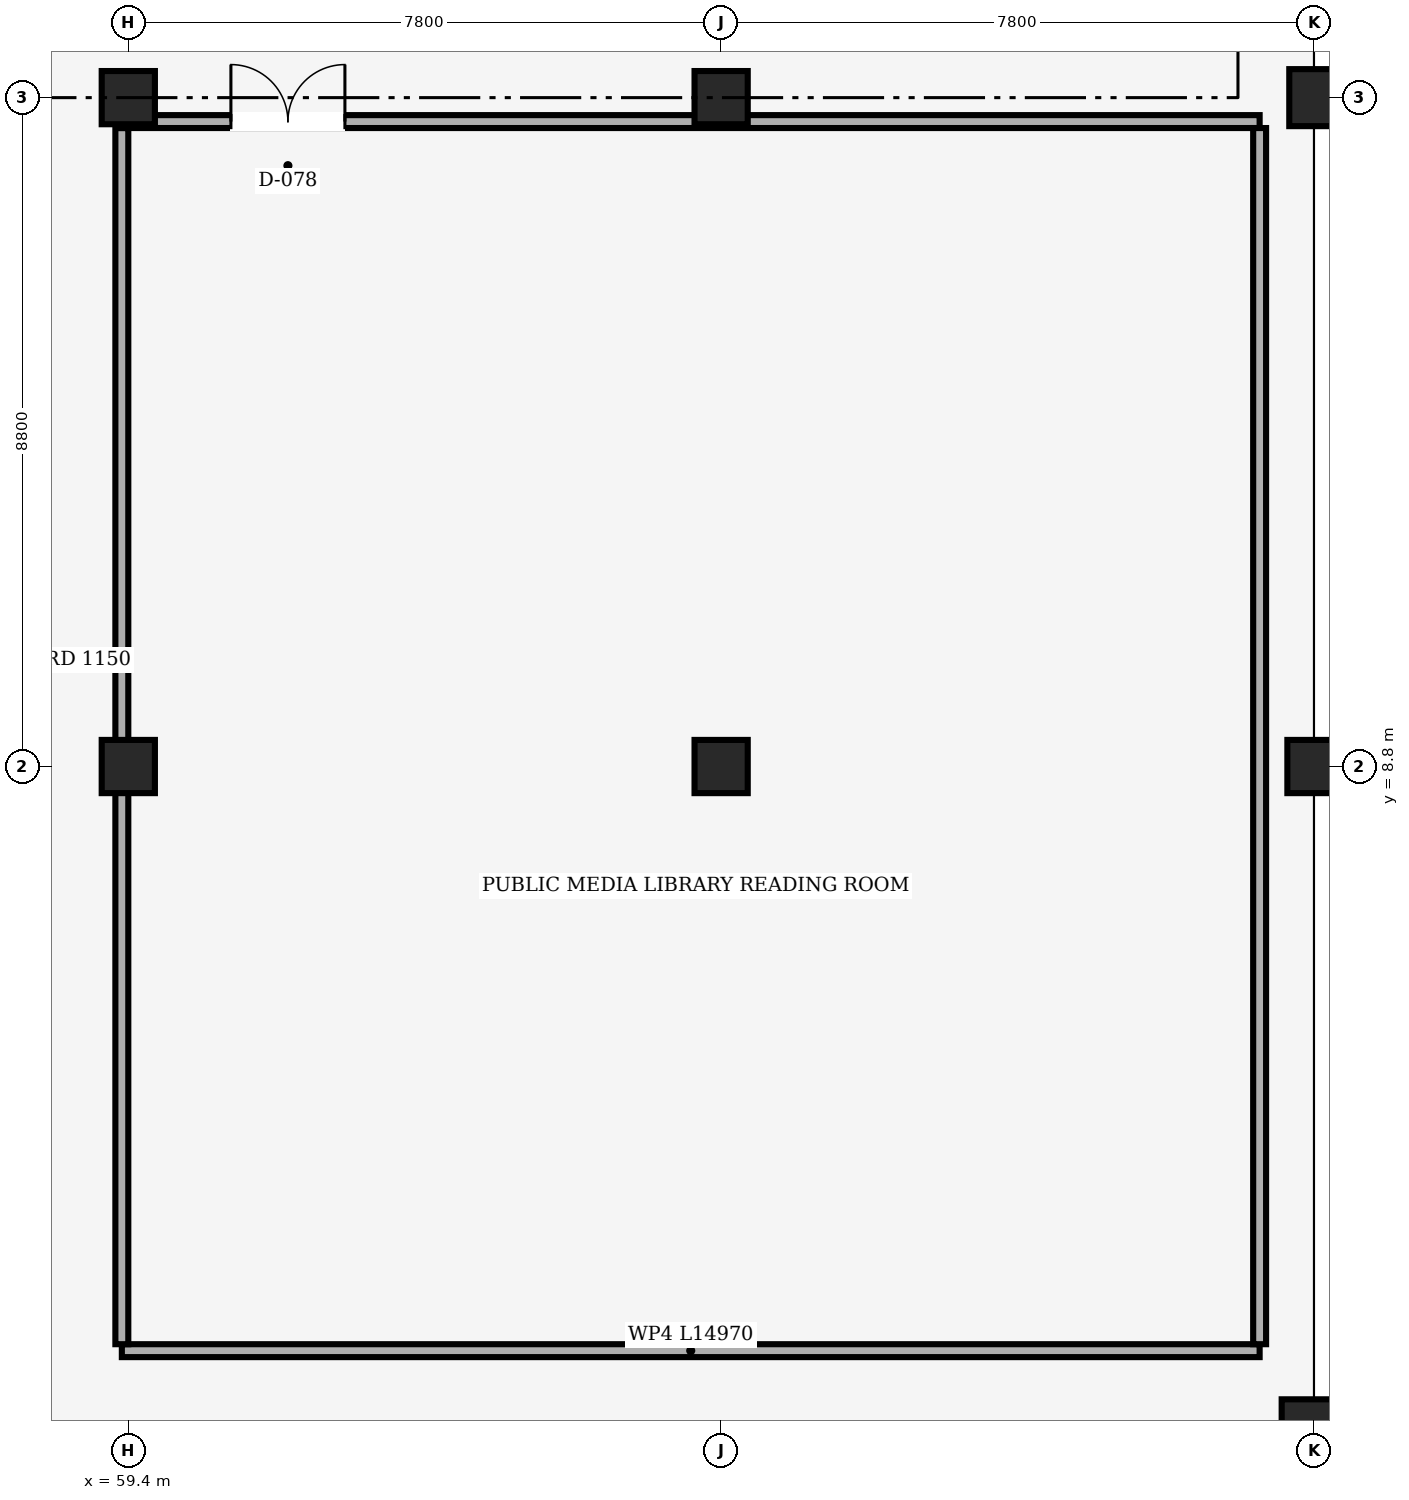
"""IFC4 building model, lengths in metres.
Left out: names, types, materials, properties, quantities, classifications, styles, units other than length and angle.
Written with IfcOpenShell. Run it as: python <this file> out.ifc"""

import sys

from ifc_helpers import new_model, si_unit, direction, frame, frame_2d, origin, origin_2d, place, context, subcontext, project, spatial, rectangle, circle, extrude, element, fill, save


model = new_model("IFC4")
c1 = context("Model", 3, precision=1e-05, world=origin(), true_north=direction((0.0, 1.0)))
c2 = subcontext(c1, "Body", "Model", "MODEL_VIEW")
j1 = project(units=[si_unit("LENGTHUNIT", "METRE"), si_unit("PLANEANGLEUNIT", "RADIAN")], contexts=[c1])
p1 = place(None, origin())
s1 = spatial("IfcSite", under=j1, at=p1, CompositionType="ELEMENT")
p2 = place(p1, origin())
s2 = spatial("IfcBuilding", under=s1, at=p2, CompositionType="ELEMENT")
p3 = place(p2, frame((0.0, 0.0, 8.4)))
s3 = spatial("IfcBuildingStorey", under=s2, at=p3, CompositionType="ELEMENT", Elevation=8.4)
for number, where, z_axis, x_axis in (
    (1, (59.4, 8.8, 0.0), (0.0, 0.0, 1.0), (1.0, 0.0, 0.0)),
    (2, (59.4, 17.6, 0.0), (0.0, 0.0, 1.0), (1.0, 0.0, 0.0)),
    (3, (67.2, 8.8, 0.0), (0.0, 0.0, 1.0), (1.0, 0.0, 0.0)),
    (4, (67.2, 17.6, 0.0), (0.0, 0.0, 1.0), (1.0, 0.0, 0.0)),
):
    element("IfcColumn", number, at=place(p3, frame(where, z_axis=z_axis, x_axis=x_axis)), inside=s3, PredefinedType="COLUMN", context=c2, shape_type="SweptSolid", body=[
        extrude(circle(Radius=0.35, at=origin_2d()), origin(), (0.0, 0.0, 1.0), 3.34),
    ])
p4 = place(p3, frame((75.0, 0.0, 0.0), z_axis=(0.0, 0.0, 1.0), x_axis=(1.0, 0.0, 0.0)))
e5 = element("IfcColumn", 5, at=p4, inside=s3, PredefinedType="COLUMN", context=c2, shape_type="SweptSolid", body=[
    extrude(rectangle(XDim=0.85, YDim=0.95, at=origin_2d()), origin(), (0.0, 0.0, 1.0), 3.34),
])
p5 = place(p3, frame((75.0, 8.8, 0.0), z_axis=(0.0, 0.0, 1.0), x_axis=(1.0, 0.0, 0.0)))
e6 = element("IfcColumn", 6, at=p5, inside=s3, PredefinedType="COLUMN", context=c2, shape_type="SweptSolid", body=[
    extrude(rectangle(XDim=0.7, YDim=0.7, at=origin_2d()), origin(), (0.0, 0.0, 1.0), 3.34),
])
p6 = place(p3, frame((75.0, 17.6, 0.0), z_axis=(0.0, 0.0, 1.0), x_axis=(1.0, 0.0, 0.0)))
e7 = element("IfcColumn", 7, at=p6, inside=s3, PredefinedType="COLUMN", context=c2, shape_type="SweptSolid", body=[
    extrude(rectangle(XDim=0.65, YDim=0.75, at=origin_2d()), origin(), (0.0, 0.0, 1.0), 3.34),
])
p7 = place(p3, frame((74.285, 1.115, 0.0), z_axis=(0.0, 0.0, 1.0), x_axis=(-1.0, 0.0, 0.0)))
e8 = element("IfcWall", 8, at=p7, inside=s3, PredefinedType="PARTITIONING", context=c2, shape_type="SweptSolid", body=[
    extrude(rectangle(XDim=14.97, YDim=0.17, at=frame_2d((7.485, 0.0))), origin(), (0.0, 0.0, 1.0), 3.32),
])
p8 = place(p3, frame((59.315, 1.2, 0.0), z_axis=(0.0, 0.0, 1.0), x_axis=(0.0, 1.0, 0.0)))
e9 = element("IfcWall", 9, at=p8, inside=s3, PredefinedType="PARTITIONING", context=c2, shape_type="SweptSolid", body=[
    extrude(rectangle(XDim=16.0, YDim=0.17, at=frame_2d((8.0, 0.0))), origin(), (0.0, 0.0, 1.0), 2.62),
])
p9 = place(p3, frame((59.315, 17.285, 0.0), z_axis=(0.0, 0.0, 1.0), x_axis=(1.0, 0.0, 0.0)))
e10 = element("IfcWall", 10, at=p9, inside=s3, PredefinedType="PARTITIONING", context=c2, shape_type="SweptSolid", body=[
    extrude(rectangle(XDim=14.97, YDim=0.17, at=frame_2d((7.485, 0.0))), origin(), (0.0, 0.0, 1.0), 2.57),
])
p10 = place(p9, frame((1.435, 0.0, 0.0)))
e11 = element("IfcOpeningElement", 11, at=p10, cuts=e10, PredefinedType="OPENING", context=c2, shape_type="SweptSolid", body=[
    extrude(rectangle(XDim=1.5, YDim=2.2, at=frame_2d((0.75, 1.1))), frame((0.0, 0.085, 0.0), z_axis=(0.0, -1.0, 0.0), x_axis=(1.0, 0.0, 0.0)), (0.0, 0.0, 1.0), 0.17),
])
p11 = place(p3, frame((74.285, 17.2, 0.0), z_axis=(0.0, 0.0, 1.0), x_axis=(0.0, -1.0, 0.0)))
e12 = element("IfcWall", 12, at=p11, inside=s3, PredefinedType="PARTITIONING", context=c2, shape_type="SweptSolid", body=[
    extrude(rectangle(XDim=16.0, YDim=0.17, at=frame_2d((8.0, 0.0))), origin(), (0.0, 0.0, 1.0), 3.32),
])
p12 = place(p10, origin())
e13 = element("IfcDoor", 13, at=p12, inside=s3, OperationType="DOUBLE_DOOR_SINGLE_SWING", PredefinedType="DOOR", context=c2, shape_type="SweptSolid", body=[
    extrude(rectangle(XDim=1.5, YDim=2.2, at=frame_2d((0.75, 1.1))), frame((0.0, 0.025, 0.0), z_axis=(0.0, -1.0, 0.0), x_axis=(1.0, 0.0, 0.0)), (0.0, 0.0, 1.0), 0.05),
])
fill(e11, e13)
save(model, sys.argv[1])
